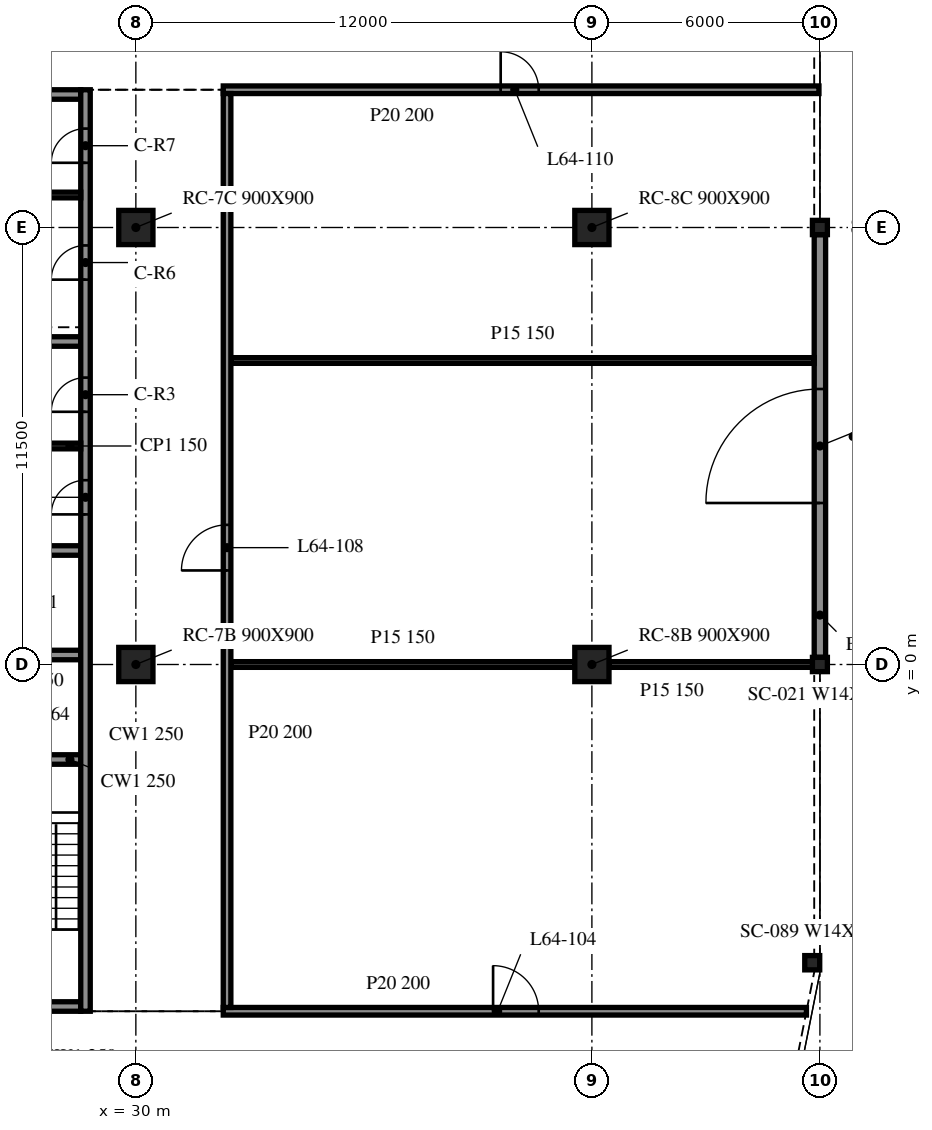
"""IFC4 building model, lengths in metres.
Left out: names, types, materials, properties, quantities, classifications, styles, units other than length and angle.
Written with IfcOpenShell. Run it as: python <this file> out.ifc"""

import sys

from ifc_helpers import new_model, si_unit, direction, frame, frame_2d, origin, origin_2d, place, context, subcontext, project, spatial, rectangle, i_section, extrude, element, fill, save


model = new_model("IFC4")
c1 = context("Model", 3, precision=1e-05, world=origin(), true_north=direction((0.0, 1.0)))
c2 = subcontext(c1, "Body", "Model", "MODEL_VIEW")
j1 = project(units=[si_unit("LENGTHUNIT", "METRE"), si_unit("PLANEANGLEUNIT", "RADIAN")], contexts=[c1])
p1 = place(None, origin())
s1 = spatial("IfcSite", under=j1, at=p1, CompositionType="ELEMENT")
p2 = place(p1, origin())
s2 = spatial("IfcBuilding", under=s1, at=p2, CompositionType="ELEMENT")
p3 = place(p2, frame((0.0, 0.0, 263.3)))
s3 = spatial("IfcBuildingStorey", under=s2, at=p3, CompositionType="ELEMENT", Elevation=263.3)
for number, where, z_axis, x_axis in (
    (1, (30.0, 0.0, -0.34), (0.0, 0.0, 1.0), (1.0, 0.0, 0.0)),
    (2, (30.0, 11.5, -0.34), (0.0, 0.0, 1.0), (1.0, 0.0, 0.0)),
    (3, (42.0, 0.0, -0.34), (0.0, 0.0, 1.0), (1.0, 0.0, 0.0)),
    (4, (42.0, 11.5, -0.34), (0.0, 0.0, 1.0), (1.0, 0.0, 0.0)),
):
    element("IfcColumn", number, at=place(p3, frame(where, z_axis=z_axis, x_axis=x_axis)), inside=s3, PredefinedType="COLUMN", context=c2, shape_type="SweptSolid", body=[
        extrude(rectangle(XDim=0.9, YDim=0.9, at=origin_2d()), origin(), (0.0, 0.0, 1.0), 3.8),
    ])
for number, where, z_axis, x_axis in (
    (5, (47.798, -7.848, -0.34), (0.0, 0.0, 1.0), (1.0, 0.0, 0.0)),
    (6, (48.0, 0.0, -0.34), (0.0, 0.0, 1.0), (1.0, 0.0, 0.0)),
    (7, (48.0, 11.5, -0.34), (0.0, 0.0, 1.0), (1.0, 0.0, 0.0)),
):
    element("IfcColumn", number, at=place(p3, frame(where, z_axis=z_axis, x_axis=x_axis)), inside=s3, PredefinedType="COLUMN", context=c2, shape_type="SweptSolid", body=[
        extrude(i_section(OverallWidth=0.394, OverallDepth=0.376, WebThickness=0.017, FlangeThickness=0.028, at=origin_2d()), origin(), (0.0, 0.0, 1.0), 3.8),
    ])
p4 = place(p3, frame((48.0, 0.188, 0.0), z_axis=(0.0, 0.0, 1.0), x_axis=(0.0, 1.0, 0.0)))
e8 = element("IfcWall", 8, at=p4, inside=s3, PredefinedType="NOTDEFINED", context=c2, shape_type="SweptSolid", body=[
    extrude(rectangle(XDim=11.124, YDim=0.3, at=frame_2d((5.562, 0.0))), origin(), (0.0, 0.0, 1.0), 2.853),
])
p5 = place(p4, frame((4.062, 0.0, 0.0)))
e9 = element("IfcOpeningElement", 9, at=p5, cuts=e8, PredefinedType="OPENING", context=c2, shape_type="SweptSolid", body=[
    extrude(rectangle(XDim=3.0, YDim=2.4, at=frame_2d((1.5, 1.2))), frame((0.0, 0.16, 0.0), z_axis=(0.0, -1.0, 0.0), x_axis=(1.0, 0.0, 0.0)), (0.0, 0.0, 1.0), 0.32),
])
p6 = place(p3, frame((28.675, -9.125, 0.0), z_axis=(0.0, 0.0, 1.0), x_axis=(0.0, 1.0, 0.0)))
e10 = element("IfcWall", 10, at=p6, inside=s3, PredefinedType="SOLIDWALL", context=c2, shape_type="SweptSolid", body=[
    extrude(rectangle(XDim=24.25, YDim=0.25, at=frame_2d((12.125, 0.0))), origin(), (0.0, 0.0, 1.0), 3.46),
])
p7 = place(p6, frame((13.075, 0.0, 0.0)))
e11 = element("IfcOpeningElement", 11, at=p7, cuts=e10, PredefinedType="OPENING", context=c2, shape_type="SweptSolid", body=[
    extrude(rectangle(XDim=0.9, YDim=2.1, at=frame_2d((0.45, 1.05))), frame((0.0, 0.135, 0.0), z_axis=(0.0, -1.0, 0.0), x_axis=(1.0, 0.0, 0.0)), (0.0, 0.0, 1.0), 0.27),
])
p8 = place(p6, frame((15.775, 0.0, 0.0)))
e12 = element("IfcOpeningElement", 12, at=p8, cuts=e10, PredefinedType="OPENING", context=c2, shape_type="SweptSolid", body=[
    extrude(rectangle(XDim=0.9, YDim=2.1, at=frame_2d((0.45, 1.05))), frame((0.0, 0.135, 0.0), z_axis=(0.0, -1.0, 0.0), x_axis=(1.0, 0.0, 0.0)), (0.0, 0.0, 1.0), 0.27),
])
p9 = place(p6, frame((19.252, 0.0, 0.0)))
e13 = element("IfcOpeningElement", 13, at=p9, cuts=e10, PredefinedType="OPENING", context=c2, shape_type="SweptSolid", body=[
    extrude(rectangle(XDim=0.9, YDim=2.1, at=frame_2d((0.45, 1.05))), frame((0.0, 0.135, 0.0), z_axis=(0.0, -1.0, 0.0), x_axis=(1.0, 0.0, 0.0)), (0.0, 0.0, 1.0), 0.27),
])
p10 = place(p6, frame((22.327, 0.0, 0.0)))
e14 = element("IfcOpeningElement", 14, at=p10, cuts=e10, PredefinedType="OPENING", context=c2, shape_type="SweptSolid", body=[
    extrude(rectangle(XDim=0.9, YDim=2.1, at=frame_2d((0.45, 1.05))), frame((0.0, 0.135, 0.0), z_axis=(0.0, -1.0, 0.0), x_axis=(1.0, 0.0, 0.0)), (0.0, 0.0, 1.0), 0.27),
])
p11 = place(p3, frame((28.55, -9.0, 0.0), z_axis=(0.0, 0.0, 1.0), x_axis=(-1.0, 0.0, 0.0)))
e15 = element("IfcWall", 15, at=p11, inside=s3, PredefinedType="SOLIDWALL", context=c2, shape_type="SweptSolid", body=[
    extrude(rectangle(XDim=9.1, YDim=0.25, at=frame_2d((4.55, 0.0))), origin(), (0.0, 0.0, 1.0), 3.46),
])
p12 = place(p11, frame((3.65, 0.0, 0.0)))
e16 = element("IfcOpeningElement", 16, at=p12, cuts=e15, PredefinedType="OPENING", context=c2, shape_type="SweptSolid", body=[
    extrude(rectangle(XDim=1.8, YDim=2.1, at=frame_2d((0.9, 1.05))), frame((0.0, 0.135, 0.0), z_axis=(0.0, -1.0, 0.0), x_axis=(1.0, 0.0, 0.0)), (0.0, 0.0, 1.0), 0.27),
])
p13 = place(p3, frame((19.45, 15.0, 0.0), z_axis=(0.0, 0.0, 1.0), x_axis=(1.0, 0.0, 0.0)))
e17 = element("IfcWall", 17, at=p13, inside=s3, PredefinedType="SOLIDWALL", context=c2, shape_type="SweptSolid", body=[
    extrude(rectangle(XDim=9.1, YDim=0.25, at=frame_2d((4.55, 0.0))), origin(), (0.0, 0.0, 1.0), 3.46),
])
p14 = place(p13, frame((3.65, 0.0, 0.0)))
e18 = element("IfcOpeningElement", 18, at=p14, cuts=e17, PredefinedType="OPENING", context=c2, shape_type="SweptSolid", body=[
    extrude(rectangle(XDim=1.8, YDim=2.1, at=frame_2d((0.9, 1.05))), frame((0.0, 0.135, 0.0), z_axis=(0.0, -1.0, 0.0), x_axis=(1.0, 0.0, 0.0)), (0.0, 0.0, 1.0), 0.27),
])
for number, where, z_axis, x_axis in (
    (19, (25.7, -2.5, 0.0), (0.0, 0.0, 1.0), (1.0, 0.0, 0.0)),
    (20, (25.7, 0.25, 0.0), (0.0, 0.0, 1.0), (1.0, 0.0, 0.0)),
    (21, (25.7, 3.0, 0.0), (0.0, 0.0, 1.0), (1.0, 0.0, 0.0)),
    (22, (25.7, 8.5, 0.0), (0.0, 0.0, 1.0), (1.0, 0.0, 0.0)),
):
    element("IfcWall", number, at=place(p3, frame(where, z_axis=z_axis, x_axis=x_axis)), inside=s3, PredefinedType="SOLIDWALL", context=c2, shape_type="SweptSolid", body=[
        extrude(rectangle(XDim=2.85, YDim=0.25, at=frame_2d((1.425, 0.0))), origin(), (0.0, 0.0, 1.0), 3.46),
    ])
for number, where, z_axis, x_axis in (
    (23, (25.7, 5.75, 0.0), (0.0, 0.0, 1.0), (1.0, 0.0, 0.0)),
    (24, (25.7, 12.355, 0.0), (0.0, 0.0, 1.0), (1.0, 0.0, 0.0)),
):
    element("IfcWall", number, at=place(p3, frame(where, z_axis=z_axis, x_axis=x_axis)), inside=s3, PredefinedType="PARTITIONING", context=c2, shape_type="SweptSolid", body=[
        extrude(rectangle(XDim=2.85, YDim=0.15, at=frame_2d((1.425, 0.0))), origin(), (0.0, 0.0, 1.0), 3.46),
    ])
p15 = place(p3, frame((32.3, -9.125, 0.0), z_axis=(0.0, 0.0, 1.0), x_axis=(1.0, 0.0, 0.0)))
e25 = element("IfcWall", 25, at=p15, inside=s3, PredefinedType="PARTITIONING", context=c2, shape_type="SweptSolid", body=[
    extrude(rectangle(XDim=15.345, YDim=0.2, at=frame_2d((7.673, 0.0))), origin(), (0.0, 0.0, 1.0), 3.46),
])
p16 = place(p15, frame((7.1, 0.0, 0.0)))
e26 = element("IfcOpeningElement", 26, at=p16, cuts=e25, PredefinedType="OPENING", context=c2, shape_type="SweptSolid", body=[
    extrude(rectangle(XDim=1.2, YDim=2.1, at=frame_2d((0.6, 1.05))), frame((0.0, 0.11, 0.0), z_axis=(0.0, -1.0, 0.0), x_axis=(1.0, 0.0, 0.0)), (0.0, 0.0, 1.0), 0.22),
])
p17 = place(p3, frame((32.5, 0.0, 0.0), z_axis=(0.0, 0.0, 1.0), x_axis=(1.0, 0.0, 0.0)))
e27 = element("IfcWall", 27, at=p17, inside=s3, PredefinedType="PARTITIONING", context=c2, shape_type="SweptSolid", body=[
    extrude(rectangle(XDim=9.05, YDim=0.15, at=frame_2d((4.525, 0.0))), origin(), (0.0, 0.0, 1.0), 3.46),
])
p18 = place(p3, frame((42.45, 0.0, 0.0), z_axis=(0.0, 0.0, 1.0), x_axis=(1.0, 0.0, 0.0)))
e28 = element("IfcWall", 28, at=p18, inside=s3, PredefinedType="PARTITIONING", context=c2, shape_type="SweptSolid", body=[
    extrude(rectangle(XDim=5.525, YDim=0.15, at=frame_2d((2.763, 0.0))), origin(), (0.0, 0.0, 1.0), 3.46),
])
p19 = place(p3, frame((32.5, 8.0, 0.0), z_axis=(0.0, 0.0, 1.0), x_axis=(1.0, 0.0, 0.0)))
e29 = element("IfcWall", 29, at=p19, inside=s3, PredefinedType="PARTITIONING", context=c2, shape_type="SweptSolid", body=[
    extrude(rectangle(XDim=15.35, YDim=0.15, at=frame_2d((7.675, 0.0))), origin(), (0.0, 0.0, 1.0), 3.46),
])
p20 = place(p3, frame((32.3, 15.125, 0.0), z_axis=(0.0, 0.0, 1.0), x_axis=(1.0, 0.0, 0.0)))
e30 = element("IfcWall", 30, at=p20, inside=s3, PredefinedType="PARTITIONING", context=c2, shape_type="SweptSolid", body=[
    extrude(rectangle(XDim=15.675, YDim=0.2, at=frame_2d((7.837, 0.0))), origin(), (0.0, 0.0, 1.0), 3.46),
])
p21 = place(p20, frame((7.3, 0.0, 0.0)))
e31 = element("IfcOpeningElement", 31, at=p21, cuts=e30, PredefinedType="OPENING", context=c2, shape_type="SweptSolid", body=[
    extrude(rectangle(XDim=1.0, YDim=2.1, at=frame_2d((0.5, 1.05))), frame((0.0, 0.11, 0.0), z_axis=(0.0, -1.0, 0.0), x_axis=(1.0, 0.0, 0.0)), (0.0, 0.0, 1.0), 0.22),
])
p22 = place(p3, frame((32.4, -9.025, 0.0), z_axis=(0.0, 0.0, 1.0), x_axis=(0.0, 1.0, 0.0)))
e32 = element("IfcWall", 32, at=p22, inside=s3, PredefinedType="PARTITIONING", context=c2, shape_type="SweptSolid", body=[
    extrude(rectangle(XDim=24.05, YDim=0.2, at=frame_2d((12.025, 0.0))), origin(), (0.0, 0.0, 1.0), 3.46),
])
p23 = place(p22, frame((11.5, 0.0, 0.0)))
e33 = element("IfcOpeningElement", 33, at=p23, cuts=e32, PredefinedType="OPENING", context=c2, shape_type="SweptSolid", body=[
    extrude(rectangle(XDim=1.2, YDim=2.1, at=frame_2d((0.6, 1.05))), frame((0.0, 0.11, 0.0), z_axis=(0.0, -1.0, 0.0), x_axis=(1.0, 0.0, 0.0)), (0.0, 0.0, 1.0), 0.22),
])
p24 = place(p5, origin())
e34 = element("IfcDoor", 34, at=p24, inside=s3, OperationType="SINGLE_SWING_LEFT", PredefinedType="DOOR", context=c2, shape_type="SweptSolid", body=[
    extrude(rectangle(XDim=3.0, YDim=2.4, at=frame_2d((1.5, 1.2))), frame((0.0, 0.025, 0.0), z_axis=(0.0, -1.0, 0.0), x_axis=(1.0, 0.0, 0.0)), (0.0, 0.0, 1.0), 0.05),
])
fill(e9, e34)
p25 = place(p7, origin())
e35 = element("IfcDoor", 35, at=p25, inside=s3, OperationType="SINGLE_SWING_RIGHT", PredefinedType="DOOR", context=c2, shape_type="SweptSolid", body=[
    extrude(rectangle(XDim=0.9, YDim=2.1, at=frame_2d((0.45, 1.05))), frame((0.0, 0.025, 0.0), z_axis=(0.0, -1.0, 0.0), x_axis=(1.0, 0.0, 0.0)), (0.0, 0.0, 1.0), 0.05),
])
fill(e11, e35)
p26 = place(p8, origin())
e36 = element("IfcDoor", 36, at=p26, inside=s3, OperationType="SINGLE_SWING_LEFT", PredefinedType="DOOR", context=c2, shape_type="SweptSolid", body=[
    extrude(rectangle(XDim=0.9, YDim=2.1, at=frame_2d((0.45, 1.05))), frame((0.0, 0.025, 0.0), z_axis=(0.0, -1.0, 0.0), x_axis=(1.0, 0.0, 0.0)), (0.0, 0.0, 1.0), 0.05),
])
fill(e12, e36)
p27 = place(p9, origin())
e37 = element("IfcDoor", 37, at=p27, inside=s3, OperationType="SINGLE_SWING_RIGHT", PredefinedType="DOOR", context=c2, shape_type="SweptSolid", body=[
    extrude(rectangle(XDim=0.9, YDim=2.1, at=frame_2d((0.45, 1.05))), frame((0.0, 0.025, 0.0), z_axis=(0.0, -1.0, 0.0), x_axis=(1.0, 0.0, 0.0)), (0.0, 0.0, 1.0), 0.05),
])
fill(e13, e37)
p28 = place(p10, origin())
e38 = element("IfcDoor", 38, at=p28, inside=s3, OperationType="SINGLE_SWING_LEFT", PredefinedType="DOOR", context=c2, shape_type="SweptSolid", body=[
    extrude(rectangle(XDim=0.9, YDim=2.1, at=frame_2d((0.45, 1.05))), frame((0.0, 0.025, 0.0), z_axis=(0.0, -1.0, 0.0), x_axis=(1.0, 0.0, 0.0)), (0.0, 0.0, 1.0), 0.05),
])
fill(e14, e38)
p29 = place(p16, origin())
e39 = element("IfcDoor", 39, at=p29, inside=s3, OperationType="SINGLE_SWING_RIGHT", PredefinedType="DOOR", context=c2, shape_type="SweptSolid", body=[
    extrude(rectangle(XDim=1.2, YDim=2.1, at=frame_2d((0.6, 1.05))), frame((0.0, 0.025, 0.0), z_axis=(0.0, -1.0, 0.0), x_axis=(1.0, 0.0, 0.0)), (0.0, 0.0, 1.0), 0.05),
])
fill(e26, e39)
p30 = place(p23, origin())
e40 = element("IfcDoor", 40, at=p30, inside=s3, OperationType="SINGLE_SWING_LEFT", PredefinedType="DOOR", context=c2, shape_type="SweptSolid", body=[
    extrude(rectangle(XDim=1.2, YDim=2.1, at=frame_2d((0.6, 1.05))), frame((0.0, 0.025, 0.0), z_axis=(0.0, -1.0, 0.0), x_axis=(1.0, 0.0, 0.0)), (0.0, 0.0, 1.0), 0.05),
])
fill(e33, e40)
p31 = place(p21, origin())
e41 = element("IfcDoor", 41, at=p31, inside=s3, OperationType="SINGLE_SWING_LEFT", PredefinedType="DOOR", context=c2, shape_type="SweptSolid", body=[
    extrude(rectangle(XDim=1.0, YDim=2.1, at=frame_2d((0.5, 1.05))), frame((0.0, 0.025, 0.0), z_axis=(0.0, -1.0, 0.0), x_axis=(1.0, 0.0, 0.0)), (0.0, 0.0, 1.0), 0.05),
])
fill(e31, e41)
save(model, sys.argv[1])
